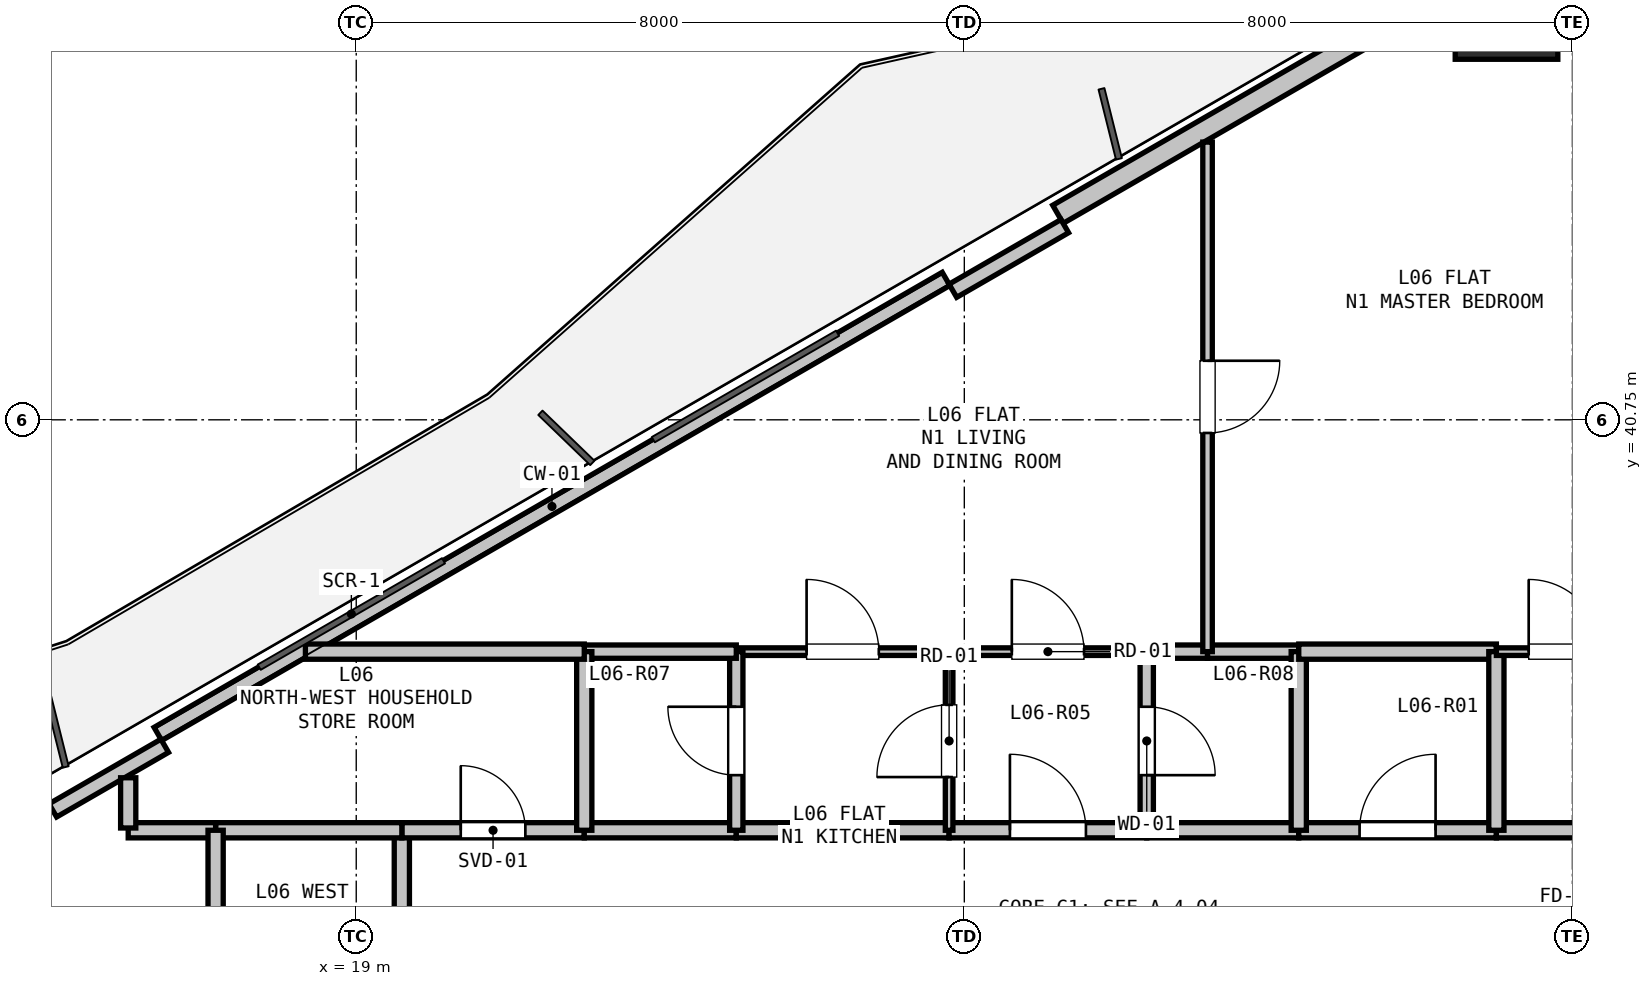
"""IFC4 building model, lengths in metres.
Left out: names, types, materials, properties, quantities, classifications, styles, units other than length and angle.
Written with IfcOpenShell. Run it as: python <this file> out.ifc"""

import sys

from ifc_helpers import new_model, si_unit, direction, frame, frame_2d, origin, origin_2d, place, context, subcontext, project, spatial, rectangle, hollow_rectangle, extrude, element, fill, save


model = new_model("IFC4")
c1 = context("Model", 3, precision=1e-05, world=origin(), true_north=direction((0.0, 1.0)))
c2 = subcontext(c1, "Body", "Model", "MODEL_VIEW")
j1 = project(units=[si_unit("LENGTHUNIT", "METRE"), si_unit("PLANEANGLEUNIT", "RADIAN")], contexts=[c1])
p1 = place(None, origin())
s1 = spatial("IfcSite", under=j1, at=p1, CompositionType="ELEMENT")
p2 = place(p1, origin())
s2 = spatial("IfcBuilding", under=s1, at=p2, CompositionType="ELEMENT")
p3 = place(p2, frame((0.0, 0.0, 25.8)))
s3 = spatial("IfcBuildingStorey", under=s2, at=p3, CompositionType="ELEMENT", Elevation=25.8)
p4 = place(p3, frame((34.133, 46.168, 0.0), z_axis=(0.0, 0.0, 1.0), x_axis=(1.0, 0.0, 0.0)))
e1 = element("IfcColumn", 1, at=p4, inside=s3, PredefinedType="COLUMN", context=c2, shape_type="SweptSolid", body=[
    extrude(hollow_rectangle(XDim=1.35, YDim=1.35, WallThickness=0.036, at=origin_2d()), origin(), (0.0, 0.0, 1.0), 3.3),
])
p5 = place(p3, frame((16.39, 36.617, 0.0), z_axis=(0.0, 0.0, 1.0), x_axis=(0.866027351828, 0.499996625875, 0.0)))
e2 = element("IfcWall", 2, at=p5, inside=s3, PredefinedType="PARAPET", context=c2, shape_type="SweptSolid", body=[
    extrude(rectangle(XDim=11.973, YDim=0.2, at=frame_2d((5.987, 0.0))), origin(), (0.0, 0.0, 1.0), 0.2),
])
p6 = place(p3, frame((28.232, 43.454, 0.0), z_axis=(0.0, 0.0, 1.0), x_axis=(0.86603192154, 0.499988710747, 0.0)))
e3 = element("IfcWall", 3, at=p6, inside=s3, PredefinedType="SOLIDWALL", context=c2, shape_type="SweptSolid", body=[
    extrude(rectangle(XDim=12.673, YDim=0.275, at=frame_2d((6.336, 0.0))), origin(), (0.0, 0.0, 1.0), 2.66),
])
p7 = place(p6, frame((4.68, 0.0, 0.9)))
e4 = element("IfcOpeningElement", 4, at=p7, cuts=e3, PredefinedType="OPENING", context=c2, shape_type="SweptSolid", body=[
    extrude(rectangle(XDim=1.2, YDim=1.4, at=frame_2d((0.6, 0.7))), frame((0.0, 0.147, 0.0), z_axis=(0.0, -1.0, 0.0), x_axis=(1.0, 0.0, 0.0)), (0.0, 0.0, 1.0), 0.295),
])
for number, where, z_axis, x_axis in (
    (5, (15.008, 35.611, 0.0), (0.0, 0.0, 1.0), (0.866, 0.5, 0.0)),
    (6, (26.85, 42.448, 0.0), (0.0, 0.0, 1.0), (0.866, 0.5, 0.0)),
):
    element("IfcWall", number, at=place(p3, frame(where, z_axis=z_axis, x_axis=x_axis)), inside=s3, PredefinedType="PARAPET", context=c2, shape_type="SweptSolid", body=[
        extrude(rectangle(XDim=1.7, YDim=0.2, at=frame_2d((0.85, 0.0))), origin(), (0.0, 0.0, 1.0), 2.66),
    ])
p8 = place(p3, frame((19.6, 29.75, 0.0), z_axis=(0.0, 0.0, 1.0), x_axis=(0.0, 1.0, 0.0)))
e7 = element("IfcWall", 7, at=p8, inside=s3, PredefinedType="PARTITIONING", context=c2, shape_type="SweptSolid", body=[
    extrude(rectangle(XDim=5.6, YDim=0.2, at=frame_2d((2.8, 0.0))), origin(), (0.0, 0.0, 1.0), 2.337),
])
p9 = place(p8, frame((2.3, 0.0, 0.0)))
e8 = element("IfcOpeningElement", 8, at=p9, cuts=e7, PredefinedType="OPENING", context=c2, shape_type="SweptSolid", body=[
    extrude(rectangle(XDim=1.0, YDim=2.15, at=frame_2d((0.5, 1.075))), frame((0.0, 0.11, 0.0), z_axis=(0.0, -1.0, 0.0), x_axis=(1.0, 0.0, 0.0)), (0.0, 0.0, 1.0), 0.22),
])
p10 = place(p3, frame((19.6, 35.35, 0.0), z_axis=(0.0, 0.0, 1.0), x_axis=(1.0, 0.0, 0.0)))
e9 = element("IfcWall", 9, at=p10, inside=s3, PredefinedType="PARTITIONING", context=c2, shape_type="SweptSolid", body=[
    extrude(rectangle(XDim=2.4, YDim=0.2, at=frame_2d((1.2, 0.0))), origin(), (0.0, 0.0, 1.0), 3.04),
])
p11 = place(p10, frame((0.775, 0.0, 0.0)))
e10 = element("IfcOpeningElement", 10, at=p11, cuts=e9, PredefinedType="OPENING", context=c2, shape_type="SweptSolid", body=[
    extrude(rectangle(XDim=0.85, YDim=2.1, at=frame_2d((0.425, 1.05))), frame((0.0, 0.11, 0.0), z_axis=(0.0, -1.0, 0.0), x_axis=(1.0, 0.0, 0.0)), (0.0, 0.0, 1.0), 0.22),
])
p12 = place(p3, frame((22.0, 35.35, 0.0), z_axis=(0.0, 0.0, 1.0), x_axis=(1.0, 0.0, 0.0)))
e11 = element("IfcWall", 11, at=p12, inside=s3, PredefinedType="PARTITIONING", context=c2, shape_type="SweptSolid", body=[
    extrude(rectangle(XDim=2.0, YDim=0.2, at=frame_2d((1.0, 0.0))), origin(), (0.0, 0.0, 1.0), 3.04),
])
p13 = place(p3, frame((24.0, 35.35, 0.0), z_axis=(0.0, 0.0, 1.0), x_axis=(1.0, 0.0, 0.0)))
e12 = element("IfcWall", 12, at=p13, inside=s3, PredefinedType="PARTITIONING", context=c2, shape_type="SweptSolid", body=[
    extrude(rectangle(XDim=2.8, YDim=0.2, at=frame_2d((1.4, 0.0))), origin(), (0.0, 0.0, 1.0), 3.04),
])
p14 = place(p3, frame((26.8, 35.35, 0.0), z_axis=(0.0, 0.0, 1.0), x_axis=(1.0, 0.0, 0.0)))
e13 = element("IfcWall", 13, at=p14, inside=s3, PredefinedType="PARTITIONING", context=c2, shape_type="SweptSolid", body=[
    extrude(rectangle(XDim=2.6, YDim=0.2, at=frame_2d((1.3, 0.0))), origin(), (0.0, 0.0, 1.0), 3.04),
])
p15 = place(p14, frame((0.8, 0.0, 0.0)))
e14 = element("IfcOpeningElement", 14, at=p15, cuts=e13, PredefinedType="OPENING", context=c2, shape_type="SweptSolid", body=[
    extrude(rectangle(XDim=1.0, YDim=2.15, at=frame_2d((0.5, 1.075))), frame((0.0, 0.11, 0.0), z_axis=(0.0, -1.0, 0.0), x_axis=(1.0, 0.0, 0.0)), (0.0, 0.0, 1.0), 0.22),
])
p16 = place(p3, frame((29.4, 35.35, 0.0), z_axis=(0.0, 0.0, 1.0), x_axis=(1.0, 0.0, 0.0)))
e15 = element("IfcWall", 15, at=p16, inside=s3, PredefinedType="PARTITIONING", context=c2, shape_type="SweptSolid", body=[
    extrude(rectangle(XDim=2.0, YDim=0.2, at=frame_2d((1.0, 0.0))), origin(), (0.0, 0.0, 1.0), 3.04),
])
p17 = place(p3, frame((31.4, 35.35, 0.0), z_axis=(0.0, 0.0, 1.0), x_axis=(1.0, 0.0, 0.0)))
e16 = element("IfcWall", 16, at=p17, inside=s3, PredefinedType="PARTITIONING", context=c2, shape_type="SweptSolid", body=[
    extrude(rectangle(XDim=2.6, YDim=0.2, at=frame_2d((1.3, 0.0))), origin(), (0.0, 0.0, 1.0), 3.04),
])
p18 = place(p17, frame((0.8, 0.0, 0.0)))
e17 = element("IfcOpeningElement", 17, at=p18, cuts=e16, PredefinedType="OPENING", context=c2, shape_type="SweptSolid", body=[
    extrude(rectangle(XDim=1.0, YDim=2.15, at=frame_2d((0.5, 1.075))), frame((0.0, 0.11, 0.0), z_axis=(0.0, -1.0, 0.0), x_axis=(1.0, 0.0, 0.0)), (0.0, 0.0, 1.0), 0.22),
])
p19 = place(p3, frame((34.0, 35.35, 0.0), z_axis=(0.0, 0.0, 1.0), x_axis=(1.0, 0.0, 0.0)))
e18 = element("IfcWall", 18, at=p19, inside=s3, PredefinedType="PARTITIONING", context=c2, shape_type="SweptSolid", body=[
    extrude(rectangle(XDim=1.8, YDim=0.2, at=frame_2d((0.9, 0.0))), origin(), (0.0, 0.0, 1.0), 3.04),
])
p20 = place(p3, frame((26.8, 37.7, 0.0), z_axis=(0.0, 0.0, 1.0), x_axis=(1.0, 0.0, 0.0)))
e19 = element("IfcWall", 19, at=p20, inside=s3, PredefinedType="PARTITIONING", context=c2, shape_type="SweptSolid", body=[
    extrude(rectangle(XDim=2.6, YDim=0.1, at=frame_2d((1.3, 0.0))), origin(), (0.0, 0.0, 1.0), 3.04),
])
p21 = place(p20, frame((0.825, 0.0, 0.0)))
e20 = element("IfcOpeningElement", 20, at=p21, cuts=e19, PredefinedType="OPENING", context=c2, shape_type="SweptSolid", body=[
    extrude(rectangle(XDim=0.95, YDim=2.1, at=frame_2d((0.475, 1.05))), frame((0.0, 0.06, 0.0), z_axis=(0.0, -1.0, 0.0), x_axis=(1.0, 0.0, 0.0)), (0.0, 0.0, 1.0), 0.12),
])
p22 = place(p3, frame((29.4, 37.7, 0.0), z_axis=(0.0, 0.0, 1.0), x_axis=(0.0, -1.0, 0.0)))
e21 = element("IfcWall", 21, at=p22, inside=s3, PredefinedType="PLUMBINGWALL", context=c2, shape_type="SweptSolid", body=[
    extrude(rectangle(XDim=2.35, YDim=0.175, at=frame_2d((1.175, 0.0))), origin(), (0.0, 0.0, 1.0), 3.04),
])
p23 = place(p22, frame((0.725, 0.0, 0.0)))
e22 = element("IfcOpeningElement", 22, at=p23, cuts=e21, PredefinedType="OPENING", context=c2, shape_type="SweptSolid", body=[
    extrude(rectangle(XDim=0.9, YDim=2.1, at=frame_2d((0.45, 1.05))), frame((0.0, 0.097, 0.0), z_axis=(0.0, -1.0, 0.0), x_axis=(1.0, 0.0, 0.0)), (0.0, 0.0, 1.0), 0.195),
])
p24 = place(p3, frame((26.8, 35.35, 0.0), z_axis=(0.0, 0.0, 1.0), x_axis=(0.0, 1.0, 0.0)))
e23 = element("IfcWall", 23, at=p24, inside=s3, PredefinedType="PARTITIONING", context=c2, shape_type="SweptSolid", body=[
    extrude(rectangle(XDim=2.35, YDim=0.1, at=frame_2d((1.175, 0.0))), origin(), (0.0, 0.0, 1.0), 3.04),
])
p25 = place(p24, frame((0.7, 0.0, 0.0)))
e24 = element("IfcOpeningElement", 24, at=p25, cuts=e23, PredefinedType="OPENING", context=c2, shape_type="SweptSolid", body=[
    extrude(rectangle(XDim=0.95, YDim=2.1, at=frame_2d((0.475, 1.05))), frame((0.0, 0.06, 0.0), z_axis=(0.0, -1.0, 0.0), x_axis=(1.0, 0.0, 0.0)), (0.0, 0.0, 1.0), 0.12),
])
p26 = place(p3, frame((24.0, 37.7, 0.0), z_axis=(0.0, 0.0, 1.0), x_axis=(1.0, 0.0, 0.0)))
e25 = element("IfcWall", 25, at=p26, inside=s3, PredefinedType="PARTITIONING", context=c2, shape_type="SweptSolid", body=[
    extrude(rectangle(XDim=2.8, YDim=0.1, at=frame_2d((1.4, 0.0))), origin(), (0.0, 0.0, 1.0), 3.04),
])
p27 = place(p26, frame((0.925, 0.0, 0.0)))
e26 = element("IfcOpeningElement", 26, at=p27, cuts=e25, PredefinedType="OPENING", context=c2, shape_type="SweptSolid", body=[
    extrude(rectangle(XDim=0.95, YDim=2.1, at=frame_2d((0.475, 1.05))), frame((0.0, 0.06, 0.0), z_axis=(0.0, -1.0, 0.0), x_axis=(1.0, 0.0, 0.0)), (0.0, 0.0, 1.0), 0.12),
])
p28 = place(p3, frame((24.0, 35.35, 0.0), z_axis=(0.0, 0.0, 1.0), x_axis=(0.0, 1.0, 0.0)))
e27 = element("IfcWall", 27, at=p28, inside=s3, PredefinedType="PLUMBINGWALL", context=c2, shape_type="SweptSolid", body=[
    extrude(rectangle(XDim=2.35, YDim=0.175, at=frame_2d((1.175, 0.0))), origin(), (0.0, 0.0, 1.0), 3.04),
])
p29 = place(p28, frame((0.725, 0.0, 0.0)))
e28 = element("IfcOpeningElement", 28, at=p29, cuts=e27, PredefinedType="OPENING", context=c2, shape_type="SweptSolid", body=[
    extrude(rectangle(XDim=0.9, YDim=2.1, at=frame_2d((0.45, 1.05))), frame((0.0, 0.097, 0.0), z_axis=(0.0, -1.0, 0.0), x_axis=(1.0, 0.0, 0.0)), (0.0, 0.0, 1.0), 0.195),
])
p30 = place(p3, frame((22.0, 37.7, 0.0), z_axis=(0.0, 0.0, 1.0), x_axis=(1.0, 0.0, 0.0)))
e29 = element("IfcWall", 29, at=p30, inside=s3, PredefinedType="PLUMBINGWALL", context=c2, shape_type="SweptSolid", body=[
    extrude(rectangle(XDim=2.0, YDim=0.175, at=frame_2d((1.0, 0.0))), origin(), (0.0, 0.0, 1.0), 3.04),
])
p31 = place(p3, frame((22.0, 35.35, 0.0), z_axis=(0.0, 0.0, 1.0), x_axis=(0.0, 1.0, 0.0)))
e30 = element("IfcWall", 30, at=p31, inside=s3, PredefinedType="PARTITIONING", context=c2, shape_type="SweptSolid", body=[
    extrude(rectangle(XDim=2.35, YDim=0.2, at=frame_2d((1.175, 0.0))), origin(), (0.0, 0.0, 1.0), 3.04),
])
p32 = place(p3, frame((29.4, 37.7, 0.0), z_axis=(0.0, 0.0, 1.0), x_axis=(1.0, 0.0, 0.0)))
e31 = element("IfcWall", 31, at=p32, inside=s3, PredefinedType="PLUMBINGWALL", context=c2, shape_type="SweptSolid", body=[
    extrude(rectangle(XDim=0.8, YDim=0.175, at=frame_2d((0.4, 0.0))), origin(), (0.0, 0.0, 1.0), 3.04),
])
p33 = place(p3, frame((30.2, 37.7, 0.0), z_axis=(0.0, 0.0, 1.0), x_axis=(1.0, 0.0, 0.0)))
e32 = element("IfcWall", 32, at=p33, inside=s3, PredefinedType="PLUMBINGWALL", context=c2, shape_type="SweptSolid", body=[
    extrude(rectangle(XDim=1.2, YDim=0.175, at=frame_2d((0.6, 0.0))), origin(), (0.0, 0.0, 1.0), 3.04),
])
p34 = place(p3, frame((31.4, 37.7, 0.0), z_axis=(0.0, 0.0, 1.0), x_axis=(0.0, -1.0, 0.0)))
e33 = element("IfcWall", 33, at=p34, inside=s3, PredefinedType="PARTITIONING", context=c2, shape_type="SweptSolid", body=[
    extrude(rectangle(XDim=2.35, YDim=0.2, at=frame_2d((1.175, 0.0))), origin(), (0.0, 0.0, 1.0), 3.04),
])
p35 = place(p3, frame((31.4, 37.7, 0.0), z_axis=(0.0, 0.0, 1.0), x_axis=(1.0, 0.0, 0.0)))
e34 = element("IfcWall", 34, at=p35, inside=s3, PredefinedType="PARTITIONING", context=c2, shape_type="SweptSolid", body=[
    extrude(rectangle(XDim=2.6, YDim=0.2, at=frame_2d((1.3, 0.0))), origin(), (0.0, 0.0, 1.0), 3.04),
])
p36 = place(p3, frame((34.0, 37.7, 0.0), z_axis=(0.0, 0.0, 1.0), x_axis=(0.0, -1.0, 0.0)))
e35 = element("IfcWall", 35, at=p36, inside=s3, PredefinedType="PARTITIONING", context=c2, shape_type="SweptSolid", body=[
    extrude(rectangle(XDim=2.35, YDim=0.2, at=frame_2d((1.175, 0.0))), origin(), (0.0, 0.0, 1.0), 3.04),
])
p37 = place(p3, frame((19.6, 35.35, 0.0), z_axis=(0.0, 0.0, 1.0), x_axis=(-1.0, 0.0, 0.0)))
e36 = element("IfcWall", 36, at=p37, inside=s3, PredefinedType="PARTITIONING", context=c2, shape_type="SweptSolid", body=[
    extrude(rectangle(XDim=2.45, YDim=0.2, at=frame_2d((1.225, 0.0))), origin(), (0.0, 0.0, 1.0), 3.04),
])
p38 = place(p3, frame((17.15, 35.35, 0.0), z_axis=(0.0, 0.0, 1.0), x_axis=(-1.0, 0.0, 0.0)))
e37 = element("IfcWall", 37, at=p38, inside=s3, PredefinedType="PARTITIONING", context=c2, shape_type="SweptSolid", body=[
    extrude(rectangle(XDim=1.15, YDim=0.2, at=frame_2d((0.575, 0.0))), origin(), (0.0, 0.0, 1.0), 3.04),
])
p39 = place(p3, frame((16.0, 35.38, 0.0), z_axis=(0.0, 0.0, 1.0), x_axis=(0.0, 1.0, 0.0)))
e38 = element("IfcWall", 38, at=p39, inside=s3, PredefinedType="PARTITIONING", context=c2, shape_type="SweptSolid", body=[
    extrude(rectangle(XDim=0.661, YDim=0.2, at=frame_2d((0.331, 0.0))), origin(), (0.0, 0.0, 1.0), 2.365),
])
p40 = place(p3, frame((18.331, 37.7, 0.0), z_axis=(0.0, 0.0, 1.0), x_axis=(1.0, 0.0, 0.0)))
e39 = element("IfcWall", 39, at=p40, inside=s3, PredefinedType="PARTITIONING", context=c2, shape_type="SweptSolid", body=[
    extrude(rectangle(XDim=3.669, YDim=0.2, at=frame_2d((1.834, 0.0))), origin(), (0.0, 0.0, 1.0), 2.365),
])
p41 = place(p3, frame((17.15, 29.75, 0.0), z_axis=(0.0, 0.0, 1.0), x_axis=(0.0, 1.0, 0.0)))
e40 = element("IfcWall", 40, at=p41, inside=s3, PredefinedType="PARTITIONING", context=c2, shape_type="SweptSolid", body=[
    extrude(rectangle(XDim=5.6, YDim=0.2, at=frame_2d((2.8, 0.0))), origin(), (0.0, 0.0, 1.0), 2.337),
])
p42 = place(p3, frame((34.0, 37.7, 0.0), z_axis=(0.0, 0.0, 1.0), x_axis=(1.0, 0.0, 0.0)))
e41 = element("IfcWall", 41, at=p42, inside=s3, PredefinedType="PARTITIONING", context=c2, shape_type="SweptSolid", body=[
    extrude(rectangle(XDim=1.8, YDim=0.1, at=frame_2d((0.9, 0.0))), origin(), (0.0, 0.0, 1.0), 3.04),
])
p43 = place(p42, frame((0.425, 0.0, 0.0)))
e42 = element("IfcOpeningElement", 42, at=p43, cuts=e41, PredefinedType="OPENING", context=c2, shape_type="SweptSolid", body=[
    extrude(rectangle(XDim=0.95, YDim=2.1, at=frame_2d((0.475, 1.05))), frame((0.0, 0.06, 0.0), z_axis=(0.0, -1.0, 0.0), x_axis=(1.0, 0.0, 0.0)), (0.0, 0.0, 1.0), 0.12),
])
p44 = place(p3, frame((30.2, 44.404, 0.0), z_axis=(0.0, 0.0, 1.0), x_axis=(0.0, -1.0, 0.0)))
e43 = element("IfcWall", 43, at=p44, inside=s3, PredefinedType="PARTITIONING", context=c2, shape_type="SweptSolid", body=[
    extrude(rectangle(XDim=6.704, YDim=0.125, at=frame_2d((3.352, 0.0))), origin(), (0.0, 0.0, 1.0), 2.365),
])
p45 = place(p44, frame((2.877, 0.0, 0.0)))
e44 = element("IfcOpeningElement", 44, at=p45, cuts=e43, PredefinedType="OPENING", context=c2, shape_type="SweptSolid", body=[
    extrude(rectangle(XDim=0.95, YDim=2.1, at=frame_2d((0.475, 1.05))), frame((0.0, 0.073, 0.0), z_axis=(0.0, -1.0, 0.0), x_axis=(1.0, 0.0, 0.0)), (0.0, 0.0, 1.0), 0.145),
])
p46 = place(p15, origin())
e45 = element("IfcDoor", 45, at=p46, inside=s3, OperationType="SINGLE_SWING_LEFT", PredefinedType="DOOR", context=c2, shape_type="SweptSolid", body=[
    extrude(rectangle(XDim=1.0, YDim=2.15, at=frame_2d((0.5, 1.075))), frame((0.0, 0.025, 0.0), z_axis=(0.0, -1.0, 0.0), x_axis=(1.0, 0.0, 0.0)), (0.0, 0.0, 1.0), 0.05),
])
fill(e14, e45)
p47 = place(p18, origin())
e46 = element("IfcDoor", 46, at=p47, inside=s3, OperationType="SINGLE_SWING_RIGHT", PredefinedType="DOOR", context=c2, shape_type="SweptSolid", body=[
    extrude(rectangle(XDim=1.0, YDim=2.15, at=frame_2d((0.5, 1.075))), frame((0.0, 0.025, 0.0), z_axis=(0.0, -1.0, 0.0), x_axis=(1.0, 0.0, 0.0)), (0.0, 0.0, 1.0), 0.05),
])
fill(e17, e46)
p48 = place(p11, origin())
e47 = element("IfcDoor", 47, at=p48, inside=s3, OperationType="SINGLE_SWING_LEFT", PredefinedType="DOOR", context=c2, shape_type="SweptSolid", body=[
    extrude(rectangle(XDim=0.85, YDim=2.1, at=frame_2d((0.425, 1.05))), frame((0.0, 0.025, 0.0), z_axis=(0.0, -1.0, 0.0), x_axis=(1.0, 0.0, 0.0)), (0.0, 0.0, 1.0), 0.05),
])
fill(e10, e47)
p49 = place(p25, origin())
e48 = element("IfcDoor", 48, at=p49, inside=s3, OperationType="SINGLE_SWING_LEFT", PredefinedType="DOOR", context=c2, shape_type="SweptSolid", body=[
    extrude(rectangle(XDim=0.95, YDim=2.1, at=frame_2d((0.475, 1.05))), frame((0.0, 0.025, 0.0), z_axis=(0.0, -1.0, 0.0), x_axis=(1.0, 0.0, 0.0)), (0.0, 0.0, 1.0), 0.05),
])
fill(e24, e48)
p50 = place(p23, origin())
e49 = element("IfcDoor", 49, at=p50, inside=s3, OperationType="SINGLE_SWING_RIGHT", PredefinedType="DOOR", context=c2, shape_type="SweptSolid", body=[
    extrude(rectangle(XDim=0.9, YDim=2.1, at=frame_2d((0.45, 1.05))), frame((0.0, 0.025, 0.0), z_axis=(0.0, -1.0, 0.0), x_axis=(1.0, 0.0, 0.0)), (0.0, 0.0, 1.0), 0.05),
])
fill(e22, e49)
p51 = place(p21, origin())
e50 = element("IfcDoor", 50, at=p51, inside=s3, OperationType="SINGLE_SWING_LEFT", PredefinedType="DOOR", context=c2, shape_type="SweptSolid", body=[
    extrude(rectangle(XDim=0.95, YDim=2.1, at=frame_2d((0.475, 1.05))), frame((0.0, 0.025, 0.0), z_axis=(0.0, -1.0, 0.0), x_axis=(1.0, 0.0, 0.0)), (0.0, 0.0, 1.0), 0.05),
])
fill(e20, e50)
p52 = place(p27, origin())
e51 = element("IfcDoor", 51, at=p52, inside=s3, OperationType="SINGLE_SWING_LEFT", PredefinedType="DOOR", context=c2, shape_type="SweptSolid", body=[
    extrude(rectangle(XDim=0.95, YDim=2.1, at=frame_2d((0.475, 1.05))), frame((0.0, 0.025, 0.0), z_axis=(0.0, -1.0, 0.0), x_axis=(1.0, 0.0, 0.0)), (0.0, 0.0, 1.0), 0.05),
])
fill(e26, e51)
p53 = place(p43, origin())
e52 = element("IfcDoor", 52, at=p53, inside=s3, OperationType="SINGLE_SWING_LEFT", PredefinedType="DOOR", context=c2, shape_type="SweptSolid", body=[
    extrude(rectangle(XDim=0.95, YDim=2.1, at=frame_2d((0.475, 1.05))), frame((0.0, 0.025, 0.0), z_axis=(0.0, -1.0, 0.0), x_axis=(1.0, 0.0, 0.0)), (0.0, 0.0, 1.0), 0.05),
])
fill(e42, e52)
p54 = place(p45, origin())
e53 = element("IfcDoor", 53, at=p54, inside=s3, OperationType="SINGLE_SWING_LEFT", PredefinedType="DOOR", context=c2, shape_type="SweptSolid", body=[
    extrude(rectangle(XDim=0.95, YDim=2.1, at=frame_2d((0.475, 1.05))), frame((0.0, 0.025, 0.0), z_axis=(0.0, -1.0, 0.0), x_axis=(1.0, 0.0, 0.0)), (0.0, 0.0, 1.0), 0.05),
])
fill(e44, e53)
p55 = place(p29, origin())
e54 = element("IfcDoor", 54, at=p55, inside=s3, OperationType="SINGLE_SWING_RIGHT", PredefinedType="DOOR", context=c2, shape_type="SweptSolid", body=[
    extrude(rectangle(XDim=0.9, YDim=2.1, at=frame_2d((0.45, 1.05))), frame((0.0, 0.025, 0.0), z_axis=(0.0, -1.0, 0.0), x_axis=(1.0, 0.0, 0.0)), (0.0, 0.0, 1.0), 0.05),
])
fill(e28, e54)
save(model, sys.argv[1])
